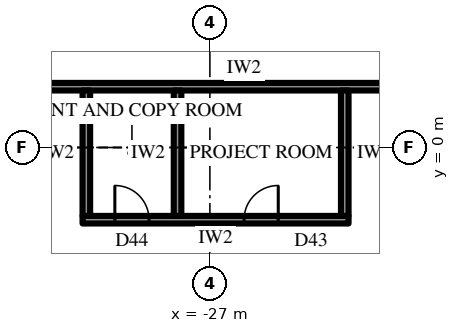
"""IFC4 building model, lengths in metres.
Left out: names, types, materials, properties, quantities, classifications, styles, units other than length and angle.
Written with IfcOpenShell. Run it as: python <this file> out.ifc"""

import sys

from ifc_helpers import new_model, si_unit, direction, frame, frame_2d, origin, place, context, subcontext, project, spatial, rectangle, extrude, element, fill, save


model = new_model("IFC4")
c1 = context("Model", 3, precision=1e-05, world=origin(), true_north=direction((0.0, 1.0)))
c2 = subcontext(c1, "Body", "Model", "MODEL_VIEW")
j1 = project(units=[si_unit("LENGTHUNIT", "METRE"), si_unit("PLANEANGLEUNIT", "RADIAN")], contexts=[c1])
p1 = place(None, origin())
s1 = spatial("IfcSite", under=j1, at=p1, CompositionType="ELEMENT")
p2 = place(p1, origin())
s2 = spatial("IfcBuilding", under=s1, at=p2, CompositionType="ELEMENT")
p3 = place(p2, frame((0.0, 0.0, 153.1)))
s3 = spatial("IfcBuildingStorey", under=s2, at=p3, CompositionType="ELEMENT", Elevation=153.1)
p4 = place(p3, frame((-34.656, -2.675, 0.0), z_axis=(0.0, 0.0, 1.0), x_axis=(0.500003084452, -0.866023622968, 0.0)))
e1 = element("IfcWall", 1, at=p4, inside=s3, PredefinedType="SOLIDWALL", context=c2, shape_type="SweptSolid", body=[
    extrude(rectangle(XDim=30.022, YDim=0.3, at=frame_2d((15.011, 0.0))), origin(), (0.0, 0.0, 1.0), 2.75),
])
p5 = place(p4, frame((1.052, 0.0, 0.6)))
e2 = element("IfcOpeningElement", 2, at=p5, cuts=e1, PredefinedType="OPENING", context=c2, shape_type="SweptSolid", body=[
    extrude(rectangle(XDim=2.9, YDim=1.9, at=frame_2d((1.45, 0.95))), frame((0.0, 0.16, 0.0), z_axis=(0.0, -1.0, 0.0), x_axis=(1.0, 0.0, 0.0)), (0.0, 0.0, 1.0), 0.32),
])
p6 = place(p4, frame((6.056, 0.0, 0.6)))
e3 = element("IfcOpeningElement", 3, at=p6, cuts=e1, PredefinedType="OPENING", context=c2, shape_type="SweptSolid", body=[
    extrude(rectangle(XDim=2.9, YDim=1.9, at=frame_2d((1.45, 0.95))), frame((0.0, 0.16, 0.0), z_axis=(0.0, -1.0, 0.0), x_axis=(1.0, 0.0, 0.0)), (0.0, 0.0, 1.0), 0.32),
])
p7 = place(p4, frame((11.909, 0.0, 0.0)))
e4 = element("IfcOpeningElement", 4, at=p7, cuts=e1, PredefinedType="OPENING", context=c2, shape_type="SweptSolid", body=[
    extrude(rectangle(XDim=1.2, YDim=2.4, at=frame_2d((0.6, 1.2))), frame((0.0, 0.16, 0.0), z_axis=(0.0, -1.0, 0.0), x_axis=(1.0, 0.0, 0.0)), (0.0, 0.0, 1.0), 0.32),
])
p8 = place(p4, frame((16.063, 0.0, 0.6)))
e5 = element("IfcOpeningElement", 5, at=p8, cuts=e1, PredefinedType="OPENING", context=c2, shape_type="SweptSolid", body=[
    extrude(rectangle(XDim=2.9, YDim=1.9, at=frame_2d((1.45, 0.95))), frame((0.0, 0.16, 0.0), z_axis=(0.0, -1.0, 0.0), x_axis=(1.0, 0.0, 0.0)), (0.0, 0.0, 1.0), 0.32),
])
p9 = place(p4, frame((21.067, 0.0, 0.6)))
e6 = element("IfcOpeningElement", 6, at=p9, cuts=e1, PredefinedType="OPENING", context=c2, shape_type="SweptSolid", body=[
    extrude(rectangle(XDim=2.9, YDim=1.9, at=frame_2d((1.45, 0.95))), frame((0.0, 0.16, 0.0), z_axis=(0.0, -1.0, 0.0), x_axis=(1.0, 0.0, 0.0)), (0.0, 0.0, 1.0), 0.32),
])
p10 = place(p4, frame((26.07, 0.0, 0.6)))
e7 = element("IfcOpeningElement", 7, at=p10, cuts=e1, PredefinedType="OPENING", context=c2, shape_type="SweptSolid", body=[
    extrude(rectangle(XDim=2.9, YDim=1.9, at=frame_2d((1.45, 0.95))), frame((0.0, 0.16, 0.0), z_axis=(0.0, -1.0, 0.0), x_axis=(1.0, 0.0, 0.0)), (0.0, 0.0, 1.0), 0.32),
])
p11 = place(p3, frame((-18.6, 1.6, 0.0), z_axis=(0.0, 0.0, 1.0), x_axis=(-1.0, 0.0, 0.0)))
e8 = element("IfcWall", 8, at=p11, inside=s3, PredefinedType="PARTITIONING", context=c2, shape_type="SweptSolid", body=[
    extrude(rectangle(XDim=15.002, YDim=0.2, at=frame_2d((7.501, 0.0))), origin(), (0.0, 0.0, 1.0), 4.0),
])
p12 = place(p11, frame((1.0, 0.0, 0.0)))
e9 = element("IfcOpeningElement", 9, at=p12, cuts=e8, PredefinedType="OPENING", context=c2, shape_type="SweptSolid", body=[
    extrude(rectangle(XDim=1.0, YDim=2.2, at=frame_2d((0.5, 1.1))), frame((0.0, 0.11, 0.0), z_axis=(0.0, -1.0, 0.0), x_axis=(1.0, 0.0, 0.0)), (0.0, 0.0, 1.0), 0.22),
])
p13 = place(p3, frame((-23.351, -1.9, 0.0), z_axis=(0.0, 0.0, 1.0), x_axis=(-1.0, 0.0, 0.0)))
e10 = element("IfcWall", 10, at=p13, inside=s3, PredefinedType="PARTITIONING", context=c2, shape_type="SweptSolid", body=[
    extrude(rectangle(XDim=7.0, YDim=0.2, at=frame_2d((3.5, 0.0))), origin(), (0.0, 0.0, 1.0), 4.0),
])
p14 = place(p13, frame((1.85, 0.0, 0.0)))
e11 = element("IfcOpeningElement", 11, at=p14, cuts=e10, PredefinedType="OPENING", context=c2, shape_type="SweptSolid", body=[
    extrude(rectangle(XDim=0.9, YDim=2.2, at=frame_2d((0.45, 1.1))), frame((0.0, 0.11, 0.0), z_axis=(0.0, -1.0, 0.0), x_axis=(1.0, 0.0, 0.0)), (0.0, 0.0, 1.0), 0.22),
])
p15 = place(p13, frame((5.25, 0.0, 0.0)))
e12 = element("IfcOpeningElement", 12, at=p15, cuts=e10, PredefinedType="OPENING", context=c2, shape_type="SweptSolid", body=[
    extrude(rectangle(XDim=0.9, YDim=2.2, at=frame_2d((0.45, 1.1))), frame((0.0, 0.11, 0.0), z_axis=(0.0, -1.0, 0.0), x_axis=(1.0, 0.0, 0.0)), (0.0, 0.0, 1.0), 0.22),
])
for number, where, z_axis, x_axis in (
    (13, (-23.451, 1.5, 0.0), (0.0, 0.0, 1.0), (0.0, -1.0, 0.0)),
    (14, (-27.851, 1.5, 0.0), (0.0, 0.0, 1.0), (0.0, -1.0, 0.0)),
    (15, (-30.251, 1.5, 0.0), (0.0, 0.0, 1.0), (0.0, -1.0, 0.0)),
):
    element("IfcWall", number, at=place(p3, frame(where, z_axis=z_axis, x_axis=x_axis)), inside=s3, PredefinedType="PARTITIONING", context=c2, shape_type="SweptSolid", body=[
        extrude(rectangle(XDim=3.3, YDim=0.2, at=frame_2d((1.65, 0.0))), origin(), (0.0, 0.0, 1.0), 4.0),
    ])
p16 = place(p14, frame((0.9, 0.0, 0.0), z_axis=(0.0, 0.0, 1.0), x_axis=(-1.0, 0.0, 0.0)))
e16 = element("IfcDoor", 16, at=p16, inside=s3, OperationType="SINGLE_SWING_LEFT", PredefinedType="DOOR", context=c2, shape_type="SweptSolid", body=[
    extrude(rectangle(XDim=0.9, YDim=2.2, at=frame_2d((0.45, 1.1))), frame((0.0, 0.025, 0.0), z_axis=(0.0, -1.0, 0.0), x_axis=(1.0, 0.0, 0.0)), (0.0, 0.0, 1.0), 0.05),
])
fill(e11, e16)
p17 = place(p15, frame((0.9, 0.0, 0.0), z_axis=(0.0, 0.0, 1.0), x_axis=(-1.0, 0.0, 0.0)))
e17 = element("IfcDoor", 17, at=p17, inside=s3, OperationType="SINGLE_SWING_RIGHT", PredefinedType="DOOR", context=c2, shape_type="SweptSolid", body=[
    extrude(rectangle(XDim=0.9, YDim=2.2, at=frame_2d((0.45, 1.1))), frame((0.0, 0.025, 0.0), z_axis=(0.0, -1.0, 0.0), x_axis=(1.0, 0.0, 0.0)), (0.0, 0.0, 1.0), 0.05),
])
fill(e12, e17)
save(model, sys.argv[1])
